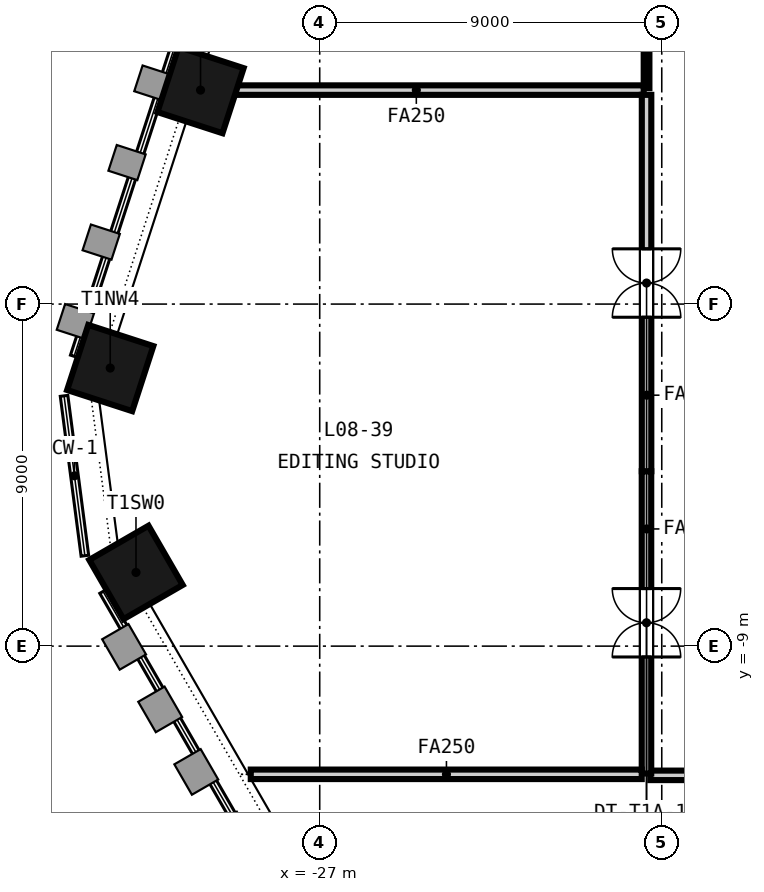
"""IFC4 building model, lengths in metres.
Left out: names, types, materials, properties, quantities, classifications, styles, units other than length and angle.
Written with IfcOpenShell. Run it as: python <this file> out.ifc"""

import sys

from ifc_helpers import new_model, si_unit, direction, frame, frame_2d, origin, origin_2d, place, context, subcontext, project, spatial, rectangle, extrude, element, fill, save


model = new_model("IFC4")
c1 = context("Model", 3, precision=1e-05, world=origin(), true_north=direction((0.0, 1.0)))
c2 = subcontext(c1, "Body", "Model", "MODEL_VIEW")
j1 = project(units=[si_unit("LENGTHUNIT", "METRE"), si_unit("PLANEANGLEUNIT", "RADIAN")], contexts=[c1])
p1 = place(None, origin())
s1 = spatial("IfcSite", under=j1, at=p1, CompositionType="ELEMENT")
p2 = place(p1, origin())
s2 = spatial("IfcBuilding", under=s1, at=p2, CompositionType="ELEMENT")
p3 = place(p2, frame((0.0, 0.0, 43.3)))
s3 = spatial("IfcBuildingStorey", under=s2, at=p3, CompositionType="ELEMENT", Elevation=43.3)
for number, where, z_axis, x_axis in (
    (1, (-30.136, 5.63, -0.15), (0.0, 0.0, 1.0), (-0.309, -0.951, 0.0)),
    (2, (-32.512, -1.683, -0.15), (0.0, 0.0, 1.0), (-0.309, -0.951, 0.0)),
    (3, (-31.834, -7.061, -0.15), (0.0, 0.0, 1.0), (0.5, -0.866, 0.0)),
):
    element("IfcColumn", number, at=place(p3, frame(where, z_axis=z_axis, x_axis=x_axis)), inside=s3, PredefinedType="COLUMN", context=c2, shape_type="SweptSolid", body=[
        extrude(rectangle(XDim=1.8, YDim=1.8, at=origin_2d()), origin(), (0.0, 0.0, 1.0), 3.65),
    ])
p4 = place(p3, frame((-15.1, -12.4, 0.0), z_axis=(0.0, 0.0, 1.0), x_axis=(-1.0, 0.0, 0.0)))
e4 = element("IfcWall", 4, at=p4, inside=s3, PredefinedType="PARTITIONING", context=c2, shape_type="SweptSolid", body=[
    extrude(rectangle(XDim=3.202, YDim=0.25, at=frame_2d((1.601, 0.0))), origin(), (0.0, 0.0, 1.0), 2.741),
])
p5 = place(p3, frame((-18.4, 5.68, 0.0), z_axis=(0.0, 0.0, 1.0), x_axis=(0.0, 1.0, 0.0)))
e5 = element("IfcWall", 5, at=p5, inside=s3, PredefinedType="PARTITIONING", context=c2, shape_type="SweptSolid", body=[
    extrude(rectangle(XDim=12.076, YDim=0.15, at=frame_2d((6.038, 0.0))), origin(), (0.0, 0.0, 1.0), 2.741),
])
p6 = place(p5, frame((5.513, 0.0, 0.0)))
e6 = element("IfcOpeningElement", 6, at=p6, cuts=e5, PredefinedType="OPENING", context=c2, shape_type="SweptSolid", body=[
    extrude(rectangle(XDim=1.0, YDim=2.1, at=frame_2d((0.5, 1.05))), frame((0.0, 0.085, 0.0), z_axis=(0.0, -1.0, 0.0), x_axis=(1.0, 0.0, 0.0)), (0.0, 0.0, 1.0), 0.17),
])
p7 = place(p3, frame((-30.451, 5.63, 0.0), z_axis=(0.0, 0.0, 1.0), x_axis=(1.0, 0.0, 0.0)))
e7 = element("IfcWall", 7, at=p7, inside=s3, PredefinedType="PARTITIONING", context=c2, shape_type="SweptSolid", body=[
    extrude(rectangle(XDim=11.976, YDim=0.25, at=frame_2d((5.988, 0.0))), origin(), (0.0, 0.0, 1.0), 2.741),
])
p8 = place(p3, frame((-18.402, -12.352, 0.0), z_axis=(0.0, 0.0, 1.0), x_axis=(0.0, 1.0, 0.0)))
e8 = element("IfcWall", 8, at=p8, inside=s3, PredefinedType="PARTITIONING", context=c2, shape_type="SweptSolid", body=[
    extrude(rectangle(XDim=7.954, YDim=0.25, at=frame_2d((3.977, 0.0))), origin(), (0.0, 0.0, 1.0), 2.741),
])
p9 = place(p8, frame((3.066, 0.0, 0.0)))
e9 = element("IfcOpeningElement", 9, at=p9, cuts=e8, PredefinedType="OPENING", context=c2, shape_type="SweptSolid", body=[
    extrude(rectangle(XDim=1.8, YDim=2.1, at=frame_2d((0.9, 1.05))), frame((0.0, 0.135, 0.0), z_axis=(0.0, -1.0, 0.0), x_axis=(1.0, 0.0, 0.0)), (0.0, 0.0, 1.0), 0.27),
])
p10 = place(p3, frame((-18.4, -4.398, 0.0), z_axis=(0.0, 0.0, 1.0), x_axis=(0.0, 1.0, 0.0)))
e10 = element("IfcWall", 10, at=p10, inside=s3, PredefinedType="PARTITIONING", context=c2, shape_type="SweptSolid", body=[
    extrude(rectangle(XDim=9.903, YDim=0.25, at=frame_2d((4.951, 0.0))), origin(), (0.0, 0.0, 1.0), 2.741),
])
p11 = place(p10, frame((4.052, 0.0, 0.0)))
e11 = element("IfcOpeningElement", 11, at=p11, cuts=e10, PredefinedType="OPENING", context=c2, shape_type="SweptSolid", body=[
    extrude(rectangle(XDim=1.8, YDim=2.1, at=frame_2d((0.9, 1.05))), frame((0.0, 0.135, 0.0), z_axis=(0.0, -1.0, 0.0), x_axis=(1.0, 0.0, 0.0)), (0.0, 0.0, 1.0), 0.27),
])
p12 = place(p3, frame((-28.814, -12.373, 0.0), z_axis=(0.0, 0.0, 1.0), x_axis=(1.0, 0.0, 0.0)))
e12 = element("IfcWall", 12, at=p12, inside=s3, PredefinedType="PARTITIONING", context=c2, shape_type="SweptSolid", body=[
    extrude(rectangle(XDim=10.287, YDim=0.25, at=frame_2d((5.144, 0.0))), origin(), (0.0, 0.0, 1.0), 2.741),
])
p13 = place(p11, origin())
e13 = element("IfcDoor", 13, at=p13, inside=s3, OperationType="DOUBLE_DOOR_DOUBLE_SWING", PredefinedType="DOOR", context=c2, shape_type="SweptSolid", body=[
    extrude(rectangle(XDim=1.8, YDim=2.1, at=frame_2d((0.9, 1.05))), frame((0.0, 0.025, 0.0), z_axis=(0.0, -1.0, 0.0), x_axis=(1.0, 0.0, 0.0)), (0.0, 0.0, 1.0), 0.05),
])
fill(e11, e13)
p14 = place(p9, origin())
e14 = element("IfcDoor", 14, at=p14, inside=s3, OperationType="DOUBLE_DOOR_DOUBLE_SWING", PredefinedType="DOOR", context=c2, shape_type="SweptSolid", body=[
    extrude(rectangle(XDim=1.8, YDim=2.1, at=frame_2d((0.9, 1.05))), frame((0.0, 0.025, 0.0), z_axis=(0.0, -1.0, 0.0), x_axis=(1.0, 0.0, 0.0)), (0.0, 0.0, 1.0), 0.05),
])
fill(e9, e14)
save(model, sys.argv[1])
